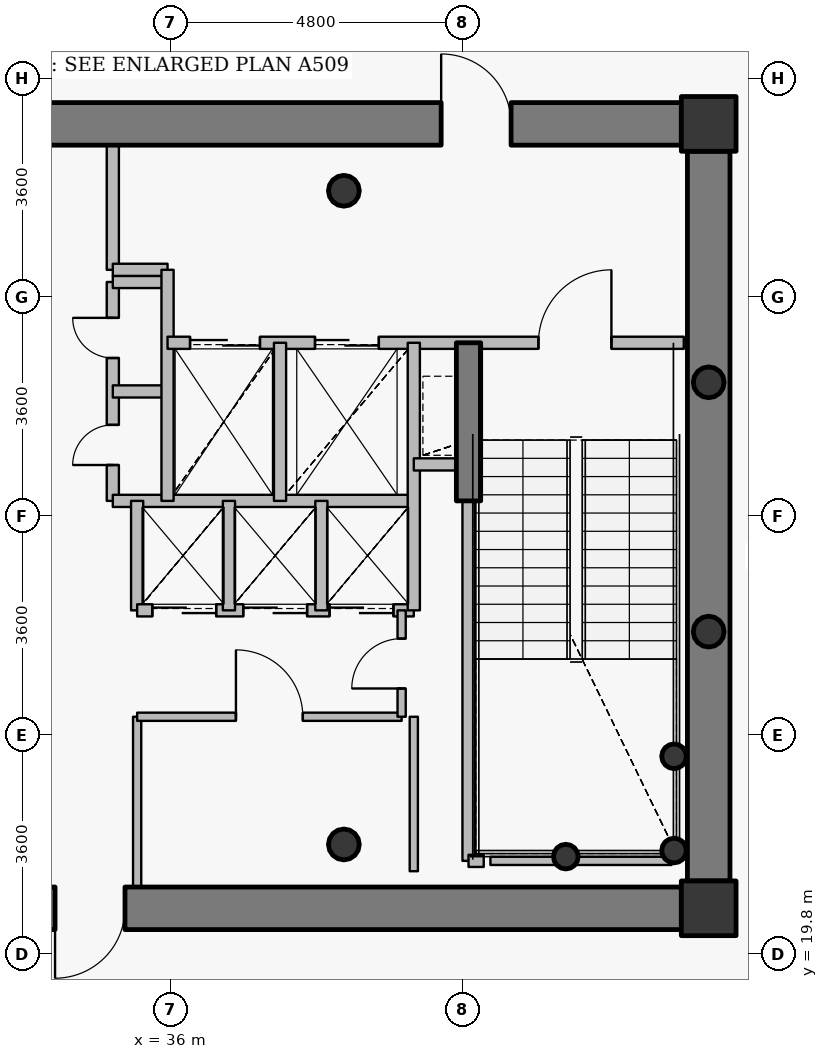
"""IFC4 building model, lengths in metres.
Left out: names, types, materials, properties, quantities, classifications, styles, units other than length and angle.
Written with IfcOpenShell. Run it as: python <this file> out.ifc"""

import sys

from ifc_helpers import new_model, si_unit, direction, frame, frame_2d, origin, origin_2d, place, context, subcontext, project, spatial, rectangle, hollow_circle, extrude, source, transform, mapped, element, fill, save


model = new_model("IFC4")
c1 = context("Model", 3, precision=1e-05, world=origin(), true_north=direction((0.0, 1.0)))
c2 = subcontext(c1, "Body", "Model", "MODEL_VIEW")
j1 = project(units=[si_unit("LENGTHUNIT", "METRE"), si_unit("PLANEANGLEUNIT", "RADIAN")], contexts=[c1])
p1 = place(None, origin())
s1 = spatial("IfcSite", under=j1, at=p1, CompositionType="ELEMENT")
p2 = place(p1, origin())
s2 = spatial("IfcBuilding", under=s1, at=p2, CompositionType="ELEMENT")
p3 = place(p2, frame((0.0, 0.0, 343.0)))
s3 = spatial("IfcBuildingStorey", under=s2, at=p3, CompositionType="ELEMENT", Elevation=343.0)
for number, where, z_axis, x_axis in (
    (1, (44.85, 20.55, 0.0), (0.0, 0.0, 1.0), (1.0, 0.0, 0.0)),
    (2, (44.85, 33.45, 0.0), (0.0, 0.0, 1.0), (1.0, 0.0, 0.0)),
):
    element("IfcColumn", number, at=place(p3, frame(where, z_axis=z_axis, x_axis=x_axis)), inside=s3, PredefinedType="COLUMN", context=c2, shape_type="SweptSolid", body=[
        extrude(rectangle(XDim=0.9, YDim=0.9, at=origin_2d()), origin(), (0.0, 0.0, 1.0), 3.8),
    ])
for number, where, z_axis, x_axis in (
    (3, (38.85, 21.6, 0.0), (0.0, 0.0, 1.0), (1.0, 0.0, 0.0)),
    (4, (38.85, 32.35, 0.0), (0.0, 0.0, 1.0), (1.0, 0.0, 0.0)),
):
    element("IfcColumn", number, at=place(p3, frame(where, z_axis=z_axis, x_axis=x_axis)), inside=s3, PredefinedType="COLUMN", context=c2, shape_type="SweptSolid", body=[
        extrude(hollow_circle(Radius=0.254, WallThickness=0.02, at=origin_2d()), origin(), (0.0, 0.0, 1.0), 3.8),
    ])
for number, where, z_axis, x_axis in (
    (5, (44.28, 21.5, 0.0), (0.0, 0.0, 1.0), (1.0, 0.0, 0.0)),
    (6, (44.28, 23.05, 0.0), (0.0, 0.0, 1.0), (1.0, 0.0, 0.0)),
    (7, (42.5, 21.4, 0.0), (0.0, 0.0, 1.0), (1.0, 0.0, 0.0)),
):
    element("IfcColumn", number, at=place(p3, frame(where, z_axis=z_axis, x_axis=x_axis)), inside=s3, PredefinedType="COLUMN", context=c2, shape_type="SweptSolid", body=[
        extrude(hollow_circle(Radius=0.203, WallThickness=0.016, at=origin_2d()), origin(), (0.0, 0.0, 1.0), 3.8),
    ])
p4 = place(p3, frame((27.6, 33.45, 0.0), z_axis=(0.0, 0.0, 1.0), x_axis=(1.0, 0.0, 0.0)))
e8 = element("IfcWall", 8, at=p4, inside=s3, PredefinedType="SHEAR", context=c2, shape_type="SweptSolid", body=[
    extrude(rectangle(XDim=16.8, YDim=0.7, at=frame_2d((8.4, 0.0))), origin(), (0.0, 0.0, 1.0), 3.05),
])
p5 = place(p4, frame((12.85, 0.0, 0.0)))
e9 = element("IfcOpeningElement", 9, at=p5, cuts=e8, PredefinedType="OPENING", context=c2, shape_type="SweptSolid", body=[
    extrude(rectangle(XDim=1.15, YDim=2.15, at=origin_2d()), frame((0.575, 0.36, 1.075), z_axis=(0.0, -1.0, 0.0), x_axis=(1.0, 0.0, 0.0)), (0.0, 0.0, 1.0), 0.72),
])
p6 = place(p3, frame((44.85, 33.0, 0.0), z_axis=(0.0, 0.0, 1.0), x_axis=(0.0, -1.0, 0.0)))
e10 = element("IfcWall", 10, at=p6, inside=s3, PredefinedType="SHEAR", context=c2, shape_type="SweptSolid", body=[
    extrude(rectangle(XDim=12.0, YDim=0.7, at=frame_2d((6.0, 0.0))), origin(), (0.0, 0.0, 1.0), 3.05),
])
p7 = place(p3, frame((44.4, 20.55, 0.0), z_axis=(0.0, 0.0, 1.0), x_axis=(-1.0, 0.0, 0.0)))
e11 = element("IfcWall", 11, at=p7, inside=s3, PredefinedType="SHEAR", context=c2, shape_type="SweptSolid", body=[
    extrude(rectangle(XDim=16.8, YDim=0.7, at=frame_2d((8.4, 0.0))), origin(), (0.0, 0.0, 1.0), 3.05),
])
p8 = place(p7, frame((13.0, 0.0, 0.0)))
e12 = element("IfcOpeningElement", 12, at=p8, cuts=e11, PredefinedType="OPENING", context=c2, shape_type="SweptSolid", body=[
    extrude(rectangle(XDim=1.15, YDim=2.15, at=origin_2d()), frame((0.575, 0.36, 1.075), z_axis=(0.0, -1.0, 0.0), x_axis=(1.0, 0.0, 0.0)), (0.0, 0.0, 1.0), 0.72),
])
p9 = place(p7, frame((9.15, 0.0, 0.0)))
e13 = element("IfcOpeningElement", 13, at=p9, cuts=e11, PredefinedType="OPENING", context=c2, shape_type="SweptSolid", body=[
    extrude(rectangle(XDim=1.15, YDim=2.15, at=origin_2d()), frame((0.575, 0.36, 1.075), z_axis=(0.0, -1.0, 0.0), x_axis=(1.0, 0.0, 0.0)), (0.0, 0.0, 1.0), 0.72),
])
p10 = place(p3, frame((40.9, 27.25, 0.0), z_axis=(0.0, 0.0, 1.0), x_axis=(0.0, 1.0, 0.0)))
e14 = element("IfcWall", 14, at=p10, inside=s3, PredefinedType="SHEAR", context=c2, shape_type="SweptSolid", body=[
    extrude(rectangle(XDim=2.6, YDim=0.4, at=frame_2d((1.3, 0.0))), origin(), (0.0, 0.0, 1.0), 3.1),
])
for number, where, z_axis, x_axis in (
    (15, (44.85, 25.1, 0.0), (0.0, 0.0, 1.0), (1.0, 0.0, 0.0)),
    (16, (44.85, 29.2, 0.0), (0.0, 0.0, 1.0), (1.0, 0.0, 0.0)),
):
    element("IfcColumn", number, at=place(p3, frame(where, z_axis=z_axis, x_axis=x_axis)), inside=s3, PredefinedType="COLUMN", context=c2, shape_type="SweptSolid", body=[
        extrude(hollow_circle(Radius=0.254, WallThickness=0.02, at=origin_2d()), origin(), (0.0, 0.0, 1.0), 3.8),
    ])
p11 = place(p3, frame((35.05, 27.25, 0.0), z_axis=(0.0, 0.0, 1.0), x_axis=(0.0, 1.0, 0.0)))
e17 = element("IfcWall", 17, at=p11, inside=s3, PredefinedType="PARTITIONING", context=c2, shape_type="SweptSolid", body=[
    extrude(rectangle(XDim=3.6, YDim=0.2, at=frame_2d((1.8, 0.0))), origin(), (0.0, 0.0, 1.0), 3.5),
])
p12 = place(p11, frame((0.59, 0.0, 0.0)))
e18 = element("IfcOpeningElement", 18, at=p12, cuts=e17, PredefinedType="OPENING", context=c2, shape_type="SweptSolid", body=[
    extrude(rectangle(XDim=0.66, YDim=2.05, at=origin_2d()), frame((0.33, 0.11, 1.025), z_axis=(0.0, -1.0, 0.0), x_axis=(1.0, 0.0, 0.0)), (0.0, 0.0, 1.0), 0.22),
])
p13 = place(p11, frame((2.35, 0.0, 0.0)))
e19 = element("IfcOpeningElement", 19, at=p13, cuts=e17, PredefinedType="OPENING", context=c2, shape_type="SweptSolid", body=[
    extrude(rectangle(XDim=0.66, YDim=2.05, at=origin_2d()), frame((0.33, 0.11, 1.025), z_axis=(0.0, -1.0, 0.0), x_axis=(1.0, 0.0, 0.0)), (0.0, 0.0, 1.0), 0.22),
])
p14 = place(p3, frame((35.05, 27.25, 0.0), z_axis=(0.0, 0.0, 1.0), x_axis=(1.0, 0.0, 0.0)))
e20 = element("IfcWall", 20, at=p14, inside=s3, PredefinedType="PARTITIONING", context=c2, shape_type="SweptSolid", body=[
    extrude(rectangle(XDim=4.95, YDim=0.2, at=frame_2d((2.475, 0.0))), origin(), (0.0, 0.0, 1.0), 3.085),
])
for number, where, z_axis, x_axis in (
    (21, (35.05, 29.05, 0.0), (0.0, 0.0, 1.0), (1.0, 0.0, 0.0)),
    (22, (35.05, 30.85, 0.0), (0.0, 0.0, 1.0), (1.0, 0.0, 0.0)),
):
    element("IfcWall", number, at=place(p3, frame(where, z_axis=z_axis, x_axis=x_axis)), inside=s3, PredefinedType="PARTITIONING", context=c2, shape_type="SweptSolid", body=[
        extrude(rectangle(XDim=0.9, YDim=0.2, at=frame_2d((0.45, 0.0))), origin(), (0.0, 0.0, 1.0), 3.5),
    ])
p15 = place(p3, frame((35.05, 31.05, 0.0), z_axis=(0.0, 0.0, 1.0), x_axis=(0.0, 1.0, 0.0)))
e23 = element("IfcWall", 23, at=p15, inside=s3, PredefinedType="PARTITIONING", context=c2, shape_type="SweptSolid", body=[
    extrude(rectangle(XDim=2.05, YDim=0.2, at=frame_2d((1.025, 0.0))), origin(), (0.0, 0.0, 1.0), 3.085),
])
p16 = place(p3, frame((35.05, 31.05, 0.0), z_axis=(0.0, 0.0, 1.0), x_axis=(1.0, 0.0, 0.0)))
e24 = element("IfcWall", 24, at=p16, inside=s3, PredefinedType="PARTITIONING", context=c2, shape_type="SweptSolid", body=[
    extrude(rectangle(XDim=0.9, YDim=0.2, at=frame_2d((0.45, 0.0))), origin(), (0.0, 0.0, 1.0), 3.5),
])
p17 = place(p3, frame((35.45, 20.9, 0.0), z_axis=(0.0, 0.0, 1.0), x_axis=(0.0, 1.0, 0.0)))
e25 = element("IfcWall", 25, at=p17, inside=s3, PredefinedType="PARTITIONING", context=c2, shape_type="SweptSolid", body=[
    extrude(rectangle(XDim=2.8, YDim=0.135, at=frame_2d((1.4, 0.0))), origin(), (0.0, 0.0, 1.0), 3.085),
])
p18 = place(p3, frame((35.45, 23.7, 0.0), z_axis=(0.0, 0.0, 1.0), x_axis=(1.0, 0.0, 0.0)))
e26 = element("IfcWall", 26, at=p18, inside=s3, PredefinedType="PARTITIONING", context=c2, shape_type="SweptSolid", body=[
    extrude(rectangle(XDim=4.35, YDim=0.135, at=frame_2d((2.175, 0.0))), origin(), (0.0, 0.0, 1.0), 3.085),
])
p19 = place(p18, frame((1.625, 0.0, 0.0)))
e27 = element("IfcOpeningElement", 27, at=p19, cuts=e26, PredefinedType="OPENING", context=c2, shape_type="SweptSolid", body=[
    extrude(rectangle(XDim=1.1, YDim=2.15, at=origin_2d()), frame((0.55, 0.078, 1.075), z_axis=(0.0, -1.0, 0.0), x_axis=(1.0, 0.0, 0.0)), (0.0, 0.0, 1.0), 0.155),
])
p20 = place(p3, frame((35.45, 25.45, 0.0), z_axis=(0.0, 0.0, 1.0), x_axis=(0.0, 1.0, 0.0)))
e28 = element("IfcWall", 28, at=p20, inside=s3, PredefinedType="PARTITIONING", context=c2, shape_type="SweptSolid", body=[
    extrude(rectangle(XDim=1.8, YDim=0.2, at=frame_2d((0.9, 0.0))), origin(), (0.0, 0.0, 1.0), 3.5),
])
p21 = place(p3, frame((35.45, 25.45, 0.0), z_axis=(0.0, 0.0, 1.0), x_axis=(1.0, 0.0, 0.0)))
e29 = element("IfcWall", 29, at=p21, inside=s3, PredefinedType="PARTITIONING", context=c2, shape_type="SweptSolid", body=[
    extrude(rectangle(XDim=4.55, YDim=0.2, at=frame_2d((2.275, 0.0))), origin(), (0.0, 0.0, 1.0), 3.085),
])
p22 = place(p21, frame((0.25, 0.0, 0.0)))
e30 = element("IfcOpeningElement", 30, at=p22, cuts=e29, PredefinedType="OPENING", context=c2, shape_type="SweptSolid", body=[
    extrude(rectangle(XDim=1.05, YDim=2.15, at=origin_2d()), frame((0.525, 0.11, 1.075), z_axis=(0.0, -1.0, 0.0), x_axis=(1.0, 0.0, 0.0)), (0.0, 0.0, 1.0), 0.22),
])
p23 = place(p21, frame((1.745, 0.0, 0.0)))
e31 = element("IfcOpeningElement", 31, at=p23, cuts=e29, PredefinedType="OPENING", context=c2, shape_type="SweptSolid", body=[
    extrude(rectangle(XDim=1.05, YDim=2.15, at=origin_2d()), frame((0.525, 0.11, 1.075), z_axis=(0.0, -1.0, 0.0), x_axis=(1.0, 0.0, 0.0)), (0.0, 0.0, 1.0), 0.22),
])
p24 = place(p21, frame((3.165, 0.0, 0.0)))
e32 = element("IfcOpeningElement", 32, at=p24, cuts=e29, PredefinedType="OPENING", context=c2, shape_type="SweptSolid", body=[
    extrude(rectangle(XDim=1.05, YDim=2.15, at=origin_2d()), frame((0.525, 0.11, 1.075), z_axis=(0.0, -1.0, 0.0), x_axis=(1.0, 0.0, 0.0)), (0.0, 0.0, 1.0), 0.22),
])
p25 = place(p3, frame((35.95, 27.25, 0.0), z_axis=(0.0, 0.0, 1.0), x_axis=(0.0, 1.0, 0.0)))
e33 = element("IfcWall", 33, at=p25, inside=s3, PredefinedType="PARTITIONING", context=c2, shape_type="SweptSolid", body=[
    extrude(rectangle(XDim=3.8, YDim=0.2, at=frame_2d((1.9, 0.0))), origin(), (0.0, 0.0, 1.0), 3.5),
])
p26 = place(p3, frame((35.95, 29.85, 0.0), z_axis=(0.0, 0.0, 1.0), x_axis=(1.0, 0.0, 0.0)))
e34 = element("IfcWall", 34, at=p26, inside=s3, PredefinedType="PARTITIONING", context=c2, shape_type="SweptSolid", body=[
    extrude(rectangle(XDim=8.49, YDim=0.2, at=frame_2d((4.245, 0.0))), origin(), (0.0, 0.0, 1.0), 3.085),
])
p27 = place(p26, frame((6.1, 0.0, 0.0)))
e35 = element("IfcOpeningElement", 35, at=p27, cuts=e34, PredefinedType="OPENING", context=c2, shape_type="SweptSolid", body=[
    extrude(rectangle(XDim=1.2, YDim=2.15, at=origin_2d()), frame((0.6, 0.11, 1.075), z_axis=(0.0, -1.0, 0.0), x_axis=(1.0, 0.0, 0.0)), (0.0, 0.0, 1.0), 0.22),
])
p28 = place(p26, frame((0.37, 0.0, 0.0)))
e36 = element("IfcOpeningElement", 36, at=p28, cuts=e34, PredefinedType="OPENING", context=c2, shape_type="SweptSolid", body=[
    extrude(rectangle(XDim=1.15, YDim=2.15, at=origin_2d()), frame((0.575, 0.11, 1.075), z_axis=(0.0, -1.0, 0.0), x_axis=(1.0, 0.0, 0.0)), (0.0, 0.0, 1.0), 0.22),
])
p29 = place(p26, frame((2.425, 0.0, 0.0)))
e37 = element("IfcOpeningElement", 37, at=p29, cuts=e34, PredefinedType="OPENING", context=c2, shape_type="SweptSolid", body=[
    extrude(rectangle(XDim=1.05, YDim=2.15, at=origin_2d()), frame((0.525, 0.11, 1.075), z_axis=(0.0, -1.0, 0.0), x_axis=(1.0, 0.0, 0.0)), (0.0, 0.0, 1.0), 0.22),
])
p30 = place(p3, frame((36.96, 25.45, 0.0), z_axis=(0.0, 0.0, 1.0), x_axis=(0.0, 1.0, 0.0)))
e38 = element("IfcWall", 38, at=p30, inside=s3, PredefinedType="PARTITIONING", context=c2, shape_type="SweptSolid", body=[
    extrude(rectangle(XDim=1.8, YDim=0.2, at=frame_2d((0.9, 0.0))), origin(), (0.0, 0.0, 1.0), 3.5),
])
p31 = place(p3, frame((37.8, 27.25, 0.0), z_axis=(0.0, 0.0, 1.0), x_axis=(0.0, 1.0, 0.0)))
e39 = element("IfcWall", 39, at=p31, inside=s3, PredefinedType="PARTITIONING", context=c2, shape_type="SweptSolid", body=[
    extrude(rectangle(XDim=2.6, YDim=0.2, at=frame_2d((1.3, 0.0))), origin(), (0.0, 0.0, 1.0), 3.5),
])
p32 = place(p3, frame((38.48, 25.45, 0.0), z_axis=(0.0, 0.0, 1.0), x_axis=(0.0, 1.0, 0.0)))
e40 = element("IfcWall", 40, at=p32, inside=s3, PredefinedType="PARTITIONING", context=c2, shape_type="SweptSolid", body=[
    extrude(rectangle(XDim=1.8, YDim=0.2, at=frame_2d((0.9, 0.0))), origin(), (0.0, 0.0, 1.0), 3.5),
])
p33 = place(p3, frame((39.8, 23.7, 0.0), z_axis=(0.0, 0.0, 1.0), x_axis=(0.0, 1.0, 0.0)))
e41 = element("IfcWall", 41, at=p33, inside=s3, PredefinedType="PARTITIONING", context=c2, shape_type="SweptSolid", body=[
    extrude(rectangle(XDim=1.75, YDim=0.135, at=frame_2d((0.875, 0.0))), origin(), (0.0, 0.0, 1.0), 3.5),
])
p34 = place(p33, frame((0.465, 0.0, 0.0)))
e42 = element("IfcOpeningElement", 42, at=p34, cuts=e41, PredefinedType="OPENING", context=c2, shape_type="SweptSolid", body=[
    extrude(rectangle(XDim=0.82, YDim=2.1, at=origin_2d()), frame((0.41, 0.078, 1.05), z_axis=(0.0, -1.0, 0.0), x_axis=(1.0, 0.0, 0.0)), (0.0, 0.0, 1.0), 0.155),
])
p35 = place(p3, frame((40.0, 25.45, 0.0), z_axis=(0.0, 0.0, 1.0), x_axis=(0.0, 1.0, 0.0)))
e43 = element("IfcWall", 43, at=p35, inside=s3, PredefinedType="PARTITIONING", context=c2, shape_type="SweptSolid", body=[
    extrude(rectangle(XDim=4.4, YDim=0.2, at=frame_2d((2.2, 0.0))), origin(), (0.0, 0.0, 1.0), 3.5),
])
p36 = place(p3, frame((40.0, 27.85, 0.0), z_axis=(0.0, 0.0, 1.0), x_axis=(1.0, 0.0, 0.0)))
e44 = element("IfcWall", 44, at=p36, inside=s3, PredefinedType="PARTITIONING", context=c2, shape_type="SweptSolid", body=[
    extrude(rectangle(XDim=0.9, YDim=0.2, at=frame_2d((0.45, 0.0))), origin(), (0.0, 0.0, 1.0), 3.5),
])
p37 = place(p3, frame((40.9, 21.33, 0.0), z_axis=(0.0, 0.0, 1.0), x_axis=(0.0, 1.0, 0.0)))
e45 = element("IfcWall", 45, at=p37, inside=s3, PredefinedType="PARTITIONING", context=c2, shape_type="SweptSolid", body=[
    extrude(rectangle(XDim=5.91, YDim=0.2, at=frame_2d((2.955, 0.0))), origin(), (0.0, 0.0, 1.0), 3.035),
])
p38 = place(p3, frame((40.9, 21.33, 0.0), z_axis=(0.0, 0.0, 1.0), x_axis=(1.0, 0.0, 0.0)))
e46 = element("IfcWall", 46, at=p38, inside=s3, PredefinedType="PARTITIONING", context=c2, shape_type="SweptSolid", body=[
    extrude(rectangle(XDim=0.25, YDim=0.2, at=frame_2d((0.125, 0.0))), origin(), (0.0, 0.0, 1.0), 3.035),
])
p39 = place(p3, frame((44.24, 21.33, 0.0), z_axis=(0.0, 0.0, 1.0), x_axis=(-1.0, 0.0, 0.0)))
e47 = element("IfcWall", 47, at=p39, inside=s3, PredefinedType="PARTITIONING", context=c2, shape_type="SweptSolid", body=[
    extrude(rectangle(XDim=2.98, YDim=0.135, at=frame_2d((1.49, 0.0))), origin(), (0.0, 0.0, 1.0), 3.035),
])
p40 = place(p3, frame((40.0, 23.7, 0.0), z_axis=(0.0, 0.0, 1.0), x_axis=(0.0, -1.0, 0.0)))
e48 = element("IfcWall", 48, at=p40, inside=s3, PredefinedType="PARTITIONING", context=c2, shape_type="SweptSolid", body=[
    extrude(rectangle(XDim=2.54, YDim=0.135, at=frame_2d((1.27, 0.0))), origin(), (0.0, 0.0, 1.0), 3.035),
])
p41 = place(p3, frame((45.2, 33.8, 0.0), z_axis=(0.0, 0.0, 1.0), x_axis=(-1.0, 0.0, 0.0)))
e49 = element("IfcWall", 49, at=p41, inside=s3, PredefinedType="PARTITIONING", context=c2, shape_type="SweptSolid", body=[
    extrude(rectangle(XDim=0.79, YDim=0.135, at=frame_2d((0.395, 0.0))), origin(), (0.0, 0.0, 1.0), 2.285),
])
p42 = place(p3, frame((44.41, 20.2, 0.0), z_axis=(0.0, 0.0, 1.0), x_axis=(1.0, 0.0, 0.0)))
e50 = element("IfcWall", 50, at=p42, inside=s3, PredefinedType="PARTITIONING", context=c2, shape_type="SweptSolid", body=[
    extrude(rectangle(XDim=0.79, YDim=0.135, at=frame_2d((0.395, 0.0))), origin(), (0.0, 0.0, 1.0), 2.25),
])
for number, where, z_axis, x_axis in (
    (51, (45.2, 20.508, 0.0), (0.0, 0.0, 1.0), (0.0, 1.0, 0.0)),
    (52, (45.2, 33.01, 0.0), (0.0, 0.0, 1.0), (0.0, 1.0, 0.0)),
):
    element("IfcWall", number, at=place(p3, frame(where, z_axis=z_axis, x_axis=x_axis)), inside=s3, PredefinedType="PARTITIONING", context=c2, shape_type="SweptSolid", body=[
        extrude(rectangle(XDim=0.482, YDim=0.135, at=frame_2d((0.241, 0.0))), origin(), (0.0, 0.0, 1.0), 3.5),
    ])
m1 = source(origin(), c2, "Body", "SweptSolid", [
    extrude(rectangle(XDim=1.15, YDim=2.15, at=origin_2d()), frame((0.575, 0.025, 1.075), z_axis=(0.0, -1.0, 0.0), x_axis=(1.0, 0.0, 0.0)), (0.0, 0.0, 1.0), 0.05),
])
p43 = place(p5, origin())
e53 = element("IfcDoor", 53, at=p43, inside=s3, OperationType="SINGLE_SWING_LEFT", PredefinedType="DOOR", context=c2, shape_type="MappedRepresentation", body=[
    mapped(m1, transform((0.0, 0.0, 0.0), x_axis=(1.0, 0.0, 0.0), y_axis=(0.0, 1.0, 0.0), z_axis=(0.0, 0.0, 1.0), scale=1.0)),
])
fill(e9, e53)
p44 = place(p9, origin())
e54 = element("IfcDoor", 54, at=p44, inside=s3, OperationType="SINGLE_SWING_RIGHT", PredefinedType="DOOR", context=c2, shape_type="MappedRepresentation", body=[
    mapped(m1, transform((0.0, 0.0, 0.0), x_axis=(1.0, 0.0, 0.0), y_axis=(0.0, 1.0, 0.0), z_axis=(0.0, 0.0, 1.0), scale=1.0)),
])
fill(e13, e54)
m2 = source(origin(), c2, "Body", "SweptSolid", [
    extrude(rectangle(XDim=1.2, YDim=2.15, at=origin_2d()), frame((0.6, 0.025, 1.075), z_axis=(0.0, -1.0, 0.0), x_axis=(1.0, 0.0, 0.0)), (0.0, 0.0, 1.0), 0.05),
])
p45 = place(p27, origin())
e55 = element("IfcDoor", 55, at=p45, inside=s3, OperationType="SINGLE_SWING_RIGHT", PredefinedType="DOOR", context=c2, shape_type="MappedRepresentation", body=[
    mapped(m2, transform((0.0, 0.0, 0.0), x_axis=(1.0, 0.0, 0.0), y_axis=(0.0, 1.0, 0.0), z_axis=(0.0, 0.0, 1.0), scale=1.0)),
])
fill(e35, e55)
m3 = source(origin(), c2, "Body", "SweptSolid", [
    extrude(rectangle(XDim=1.15, YDim=2.15, at=origin_2d()), frame((0.575, 0.025, 1.075), z_axis=(0.0, -1.0, 0.0), x_axis=(1.0, 0.0, 0.0)), (0.0, 0.0, 1.0), 0.05),
])
p46 = place(p28, origin())
e56 = element("IfcDoor", 56, at=p46, inside=s3, OperationType="DOUBLE_DOOR_SLIDING", PredefinedType="USERDEFINED", context=c2, shape_type="MappedRepresentation", body=[
    mapped(m3, transform((0.0, 0.0, 0.0), x_axis=(1.0, 0.0, 0.0), y_axis=(0.0, 1.0, 0.0), z_axis=(0.0, 0.0, 1.0), scale=1.0)),
])
fill(e36, e56)
m4 = source(origin(), c2, "Body", "SweptSolid", [
    extrude(rectangle(XDim=1.05, YDim=2.15, at=origin_2d()), frame((0.525, 0.025, 1.075), z_axis=(0.0, -1.0, 0.0), x_axis=(1.0, 0.0, 0.0)), (0.0, 0.0, 1.0), 0.05),
])
p47 = place(p29, origin())
e57 = element("IfcDoor", 57, at=p47, inside=s3, OperationType="DOUBLE_DOOR_SLIDING", PredefinedType="USERDEFINED", context=c2, shape_type="MappedRepresentation", body=[
    mapped(m4, transform((0.0, 0.0, 0.0), x_axis=(1.0, 0.0, 0.0), y_axis=(0.0, 1.0, 0.0), z_axis=(0.0, 0.0, 1.0), scale=1.0)),
])
fill(e37, e57)
p48 = place(p22, origin())
e58 = element("IfcDoor", 58, at=p48, inside=s3, OperationType="DOUBLE_DOOR_SLIDING", PredefinedType="USERDEFINED", context=c2, shape_type="MappedRepresentation", body=[
    mapped(m4, transform((0.0, 0.0, 0.0), x_axis=(1.0, 0.0, 0.0), y_axis=(0.0, 1.0, 0.0), z_axis=(0.0, 0.0, 1.0), scale=1.0)),
])
fill(e30, e58)
p49 = place(p23, origin())
e59 = element("IfcDoor", 59, at=p49, inside=s3, OperationType="DOUBLE_DOOR_SLIDING", PredefinedType="USERDEFINED", context=c2, shape_type="MappedRepresentation", body=[
    mapped(m4, transform((0.0, 0.0, 0.0), x_axis=(1.0, 0.0, 0.0), y_axis=(0.0, 1.0, 0.0), z_axis=(0.0, 0.0, 1.0), scale=1.0)),
])
fill(e31, e59)
p50 = place(p24, origin())
e60 = element("IfcDoor", 60, at=p50, inside=s3, OperationType="DOUBLE_DOOR_SLIDING", PredefinedType="USERDEFINED", context=c2, shape_type="MappedRepresentation", body=[
    mapped(m4, transform((0.0, 0.0, 0.0), x_axis=(1.0, 0.0, 0.0), y_axis=(0.0, 1.0, 0.0), z_axis=(0.0, 0.0, 1.0), scale=1.0)),
])
fill(e32, e60)
m5 = source(origin(), c2, "Body", "SweptSolid", [
    extrude(rectangle(XDim=0.66, YDim=2.05, at=origin_2d()), frame((0.33, 0.025, 1.025), z_axis=(0.0, -1.0, 0.0), x_axis=(1.0, 0.0, 0.0)), (0.0, 0.0, 1.0), 0.05),
])
p51 = place(p12, origin())
e61 = element("IfcDoor", 61, at=p51, inside=s3, OperationType="SINGLE_SWING_LEFT", PredefinedType="USERDEFINED", context=c2, shape_type="MappedRepresentation", body=[
    mapped(m5, transform((0.0, 0.0, 0.0), x_axis=(1.0, 0.0, 0.0), y_axis=(0.0, 1.0, 0.0), z_axis=(0.0, 0.0, 1.0), scale=1.0)),
])
fill(e18, e61)
p52 = place(p13, origin())
e62 = element("IfcDoor", 62, at=p52, inside=s3, OperationType="SINGLE_SWING_RIGHT", PredefinedType="USERDEFINED", context=c2, shape_type="MappedRepresentation", body=[
    mapped(m5, transform((0.0, 0.0, 0.0), x_axis=(1.0, 0.0, 0.0), y_axis=(0.0, 1.0, 0.0), z_axis=(0.0, 0.0, 1.0), scale=1.0)),
])
fill(e19, e62)
m6 = source(origin(), c2, "Body", "SweptSolid", [
    extrude(rectangle(XDim=1.1, YDim=2.15, at=origin_2d()), frame((0.55, 0.025, 1.075), z_axis=(0.0, -1.0, 0.0), x_axis=(1.0, 0.0, 0.0)), (0.0, 0.0, 1.0), 0.05),
])
p53 = place(p19, origin())
e63 = element("IfcDoor", 63, at=p53, inside=s3, OperationType="SINGLE_SWING_LEFT", PredefinedType="DOOR", context=c2, shape_type="MappedRepresentation", body=[
    mapped(m6, transform((0.0, 0.0, 0.0), x_axis=(1.0, 0.0, 0.0), y_axis=(0.0, 1.0, 0.0), z_axis=(0.0, 0.0, 1.0), scale=1.0)),
])
fill(e27, e63)
m7 = source(origin(), c2, "Body", "SweptSolid", [
    extrude(rectangle(XDim=0.82, YDim=2.1, at=origin_2d()), frame((0.41, 0.025, 1.05), z_axis=(0.0, -1.0, 0.0), x_axis=(1.0, 0.0, 0.0)), (0.0, 0.0, 1.0), 0.05),
])
p54 = place(p34, origin())
e64 = element("IfcDoor", 64, at=p54, inside=s3, OperationType="SINGLE_SWING_LEFT", PredefinedType="DOOR", context=c2, shape_type="MappedRepresentation", body=[
    mapped(m7, transform((0.0, 0.0, 0.0), x_axis=(1.0, 0.0, 0.0), y_axis=(0.0, 1.0, 0.0), z_axis=(0.0, 0.0, 1.0), scale=1.0)),
])
fill(e42, e64)
save(model, sys.argv[1])
